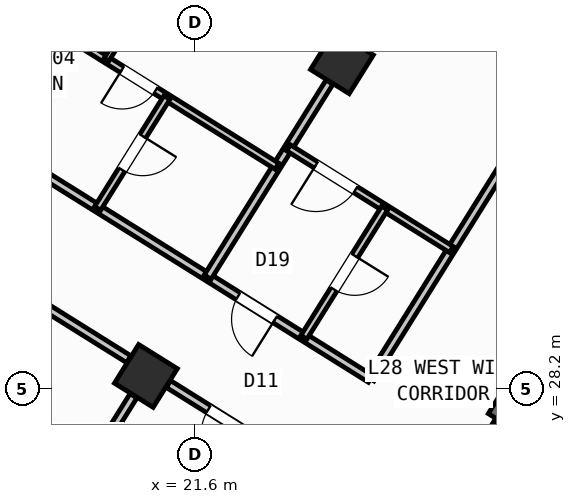
"""IFC4 building model, lengths in metres.
Left out: names, types, materials, properties, quantities, classifications, styles, units other than length and angle.
Written with IfcOpenShell. Run it as: python <this file> out.ifc"""

import sys

from ifc_helpers import new_model, si_unit, direction, frame, frame_2d, origin, origin_2d, place, context, subcontext, project, spatial, rectangle, hollow_rectangle, extrude, source, transform, mapped, element, fill, save


model = new_model("IFC4")
c1 = context("Model", 3, precision=1e-05, world=origin(), true_north=direction((0.0, 1.0)))
c2 = subcontext(c1, "Body", "Model", "MODEL_VIEW")
j1 = project(units=[si_unit("LENGTHUNIT", "METRE"), si_unit("PLANEANGLEUNIT", "RADIAN")], contexts=[c1])
p1 = place(None, origin())
s1 = spatial("IfcSite", under=j1, at=p1, CompositionType="ELEMENT")
p2 = place(p1, origin())
s2 = spatial("IfcBuilding", under=s1, at=p2, CompositionType="ELEMENT")
p3 = place(p2, frame((0.0, 0.0, 112.5)))
s3 = spatial("IfcBuildingStorey", under=s2, at=p3, CompositionType="ELEMENT", Elevation=112.5)
p4 = place(p3, frame((29.517, 30.594, 0.0), z_axis=(0.0, 0.0, 1.0), x_axis=(-0.529906864564, -0.848055844204, 0.0)))
e1 = element("IfcWall", 1, at=p4, inside=s3, PredefinedType="SHEAR", context=c2, shape_type="SweptSolid", body=[
    extrude(rectangle(XDim=3.575, YDim=0.55, at=frame_2d((1.788, 0.0))), origin(), (0.0, 0.0, 1.0), 3.35),
])
m1 = source(origin(), c2, "Body", "SweptSolid", [
    extrude(hollow_rectangle(XDim=0.9, YDim=0.9, WallThickness=0.036, at=origin_2d()), origin(), (0.0, 0.0, 1.0), 3.6),
])
for number, where, z_axis, x_axis in (
    (2, (24.5, 34.643, 0.0), (0.0, 0.0, 1.0), (-0.848, 0.53, 0.0)),
    (3, (20.632, 28.452, 0.0), (0.0, 0.0, 1.0), (-0.848, 0.53, 0.0)),
):
    element("IfcColumn", number, at=place(p3, frame(where, z_axis=z_axis, x_axis=x_axis)), inside=s3, PredefinedType="COLUMN", context=c2, shape_type="MappedRepresentation", body=[
        mapped(m1, transform((0.0, 0.0, 0.0), scale=1.0)),
    ])
p5 = place(p3, frame((31.76, 12.183, 0.0), z_axis=(0.0, 0.0, 1.0), x_axis=(-0.848047074256, 0.529920899612, 0.0)))
e4 = element("IfcWall", 4, at=p5, inside=s3, PredefinedType="STANDARD", context=c2, shape_type="SweptSolid", body=[
    extrude(rectangle(XDim=30.652, YDim=0.32, at=frame_2d((15.326, 0.0))), origin(), (0.0, 0.0, 1.0), 3.35),
])
p6 = place(p5, frame((15.153, 0.0, 0.0)))
e5 = element("IfcOpeningElement", 5, at=p6, cuts=e4, PredefinedType="OPENING", context=c2, shape_type="SweptSolid", body=[
    extrude(rectangle(XDim=1.2, YDim=2.15, at=frame_2d((0.6, 1.075))), frame((0.0, 0.17, 0.0), z_axis=(0.0, -1.0, 0.0), x_axis=(1.0, 0.0, 0.0)), (0.0, 0.0, 1.0), 0.34),
])
p7 = place(p5, frame((2.002, 0.0, 0.8)))
e6 = element("IfcOpeningElement", 6, at=p7, cuts=e4, PredefinedType="OPENING", context=c2, shape_type="SweptSolid", body=[
    extrude(rectangle(XDim=2.1, YDim=1.55, at=frame_2d((1.05, 0.775))), frame((0.0, 0.17, 0.0), z_axis=(0.0, -1.0, 0.0), x_axis=(1.0, 0.0, 0.0)), (0.0, 0.0, 1.0), 0.34),
])
p8 = place(p5, frame((7.206, 0.0, 0.8)))
e7 = element("IfcOpeningElement", 7, at=p8, cuts=e4, PredefinedType="OPENING", context=c2, shape_type="SweptSolid", body=[
    extrude(rectangle(XDim=2.1, YDim=1.55, at=frame_2d((1.05, 0.775))), frame((0.0, 0.17, 0.0), z_axis=(0.0, -1.0, 0.0), x_axis=(1.0, 0.0, 0.0)), (0.0, 0.0, 1.0), 0.34),
])
p9 = place(p5, frame((12.648, 0.0, 1.0)))
e8 = element("IfcOpeningElement", 8, at=p9, cuts=e4, PredefinedType="OPENING", context=c2, shape_type="SweptSolid", body=[
    extrude(rectangle(XDim=0.9, YDim=1.25, at=frame_2d((0.45, 0.625))), frame((0.0, 0.17, 0.0), z_axis=(0.0, -1.0, 0.0), x_axis=(1.0, 0.0, 0.0)), (0.0, 0.0, 1.0), 0.34),
])
p10 = place(p5, frame((19.59, 0.0, 0.95)))
e9 = element("IfcOpeningElement", 9, at=p10, cuts=e4, PredefinedType="OPENING", context=c2, shape_type="SweptSolid", body=[
    extrude(rectangle(XDim=1.2, YDim=1.4, at=frame_2d((0.6, 0.7))), frame((0.0, 0.17, 0.0), z_axis=(0.0, -1.0, 0.0), x_axis=(1.0, 0.0, 0.0)), (0.0, 0.0, 1.0), 0.34),
])
p11 = place(p5, frame((25.966, 0.0, 1.0)))
e10 = element("IfcOpeningElement", 10, at=p11, cuts=e4, PredefinedType="OPENING", context=c2, shape_type="SweptSolid", body=[
    extrude(rectangle(XDim=0.9, YDim=1.25, at=frame_2d((0.45, 0.625))), frame((0.0, 0.17, 0.0), z_axis=(0.0, -1.0, 0.0), x_axis=(1.0, 0.0, 0.0)), (0.0, 0.0, 1.0), 0.34),
])
p12 = place(p5, frame((28.871, 0.0, 1.0)))
e11 = element("IfcOpeningElement", 11, at=p12, cuts=e4, PredefinedType="OPENING", context=c2, shape_type="SweptSolid", body=[
    extrude(rectangle(XDim=0.9, YDim=1.25, at=frame_2d((0.45, 0.625))), frame((0.0, 0.17, 0.0), z_axis=(0.0, -1.0, 0.0), x_axis=(1.0, 0.0, 0.0)), (0.0, 0.0, 1.0), 0.34),
])
p13 = place(p3, frame((17.424, 47.083, 0.0), z_axis=(0.0, 0.0, 1.0), x_axis=(0.848049927979, -0.529916332693, 0.0)))
e12 = element("IfcWall", 12, at=p13, inside=s3, PredefinedType="STANDARD", context=c2, shape_type="SweptSolid", body=[
    extrude(rectangle(XDim=29.223, YDim=0.32, at=frame_2d((14.612, 0.0))), origin(), (0.0, 0.0, 1.0), 3.35),
])
p14 = place(p13, frame((3.77, 0.0, 0.0)))
e13 = element("IfcOpeningElement", 13, at=p14, cuts=e12, PredefinedType="OPENING", context=c2, shape_type="SweptSolid", body=[
    extrude(rectangle(XDim=1.05, YDim=2.15, at=frame_2d((0.525, 1.075))), frame((0.0, 0.17, 0.0), z_axis=(0.0, -1.0, 0.0), x_axis=(1.0, 0.0, 0.0)), (0.0, 0.0, 1.0), 0.34),
])
p15 = place(p13, frame((0.9, 0.0, 0.8)))
e14 = element("IfcOpeningElement", 14, at=p15, cuts=e12, PredefinedType="OPENING", context=c2, shape_type="SweptSolid", body=[
    extrude(rectangle(XDim=2.1, YDim=1.55, at=frame_2d((1.05, 0.775))), frame((0.0, 0.17, 0.0), z_axis=(0.0, -1.0, 0.0), x_axis=(1.0, 0.0, 0.0)), (0.0, 0.0, 1.0), 0.34),
])
p16 = place(p13, frame((6.972, 0.0, 1.0)))
e15 = element("IfcOpeningElement", 15, at=p16, cuts=e12, PredefinedType="OPENING", context=c2, shape_type="SweptSolid", body=[
    extrude(rectangle(XDim=0.9, YDim=1.25, at=frame_2d((0.45, 0.625))), frame((0.0, 0.17, 0.0), z_axis=(0.0, -1.0, 0.0), x_axis=(1.0, 0.0, 0.0)), (0.0, 0.0, 1.0), 0.34),
])
p17 = place(p13, frame((9.847, 0.0, 0.85)))
e16 = element("IfcOpeningElement", 16, at=p17, cuts=e12, PredefinedType="OPENING", context=c2, shape_type="SweptSolid", body=[
    extrude(rectangle(XDim=1.5, YDim=1.5, at=frame_2d((0.75, 0.75))), frame((0.0, 0.17, 0.0), z_axis=(0.0, -1.0, 0.0), x_axis=(1.0, 0.0, 0.0)), (0.0, 0.0, 1.0), 0.34),
])
p18 = place(p13, frame((13.889, 0.0, 0.95)))
e17 = element("IfcOpeningElement", 17, at=p18, cuts=e12, PredefinedType="OPENING", context=c2, shape_type="SweptSolid", body=[
    extrude(rectangle(XDim=1.2, YDim=1.4, at=frame_2d((0.6, 0.7))), frame((0.0, 0.17, 0.0), z_axis=(0.0, -1.0, 0.0), x_axis=(1.0, 0.0, 0.0)), (0.0, 0.0, 1.0), 0.34),
])
p19 = place(p13, frame((17.254, 0.0, 1.0)))
e18 = element("IfcOpeningElement", 18, at=p19, cuts=e12, PredefinedType="OPENING", context=c2, shape_type="SweptSolid", body=[
    extrude(rectangle(XDim=0.9, YDim=1.25, at=frame_2d((0.45, 0.625))), frame((0.0, 0.17, 0.0), z_axis=(0.0, -1.0, 0.0), x_axis=(1.0, 0.0, 0.0)), (0.0, 0.0, 1.0), 0.34),
])
p20 = place(p13, frame((20.764, 0.0, 0.8)))
e19 = element("IfcOpeningElement", 19, at=p20, cuts=e12, PredefinedType="OPENING", context=c2, shape_type="SweptSolid", body=[
    extrude(rectangle(XDim=2.1, YDim=1.55, at=frame_2d((1.05, 0.775))), frame((0.0, 0.17, 0.0), z_axis=(0.0, -1.0, 0.0), x_axis=(1.0, 0.0, 0.0)), (0.0, 0.0, 1.0), 0.34),
])
p21 = place(p13, frame((25.403, 0.0, 0.8)))
e20 = element("IfcOpeningElement", 20, at=p21, cuts=e12, PredefinedType="OPENING", context=c2, shape_type="SweptSolid", body=[
    extrude(rectangle(XDim=2.1, YDim=1.55, at=frame_2d((1.05, 0.775))), frame((0.0, 0.17, 0.0), z_axis=(0.0, -1.0, 0.0), x_axis=(1.0, 0.0, 0.0)), (0.0, 0.0, 1.0), 0.34),
])
p22 = place(p3, frame((27.596, 27.52, 0.0), z_axis=(0.0, 0.0, 1.0), x_axis=(-0.529865479138, -0.848081702443, 0.0)))
e21 = element("IfcWall", 21, at=p22, inside=s3, PredefinedType="STANDARD", context=c2, shape_type="SweptSolid", body=[
    extrude(rectangle(XDim=2.96, YDim=0.2, at=frame_2d((1.48, 0.0))), origin(), (0.0, 0.0, 1.0), 3.34),
])
p23 = place(p22, frame((1.76, 0.0, 0.0)))
e22 = element("IfcOpeningElement", 22, at=p23, cuts=e21, PredefinedType="OPENING", context=c2, shape_type="SweptSolid", body=[
    extrude(rectangle(XDim=0.86, YDim=2.05, at=frame_2d((0.43, 1.025))), frame((0.0, 0.11, 0.0), z_axis=(0.0, -1.0, 0.0), x_axis=(1.0, 0.0, 0.0)), (0.0, 0.0, 1.0), 0.22),
])
p24 = place(p3, frame((31.239, 38.274, 0.0), z_axis=(0.0, 0.0, 1.0), x_axis=(-0.529925472745, -0.848044216616, 0.0)))
e23 = element("IfcWall", 23, at=p24, inside=s3, PredefinedType="PARTITIONING", context=c2, shape_type="SweptSolid", body=[
    extrude(rectangle(XDim=11.65, YDim=0.16, at=frame_2d((5.825, 0.0))), origin(), (0.0, 0.0, 1.0), 3.34),
])
p25 = place(p3, frame((25.065, 28.394, 0.0), z_axis=(0.0, 0.0, 1.0), x_axis=(-0.848048310262, 0.529918921593, 0.0)))
e24 = element("IfcWall", 24, at=p25, inside=s3, PredefinedType="PARTITIONING", context=c2, shape_type="SweptSolid", body=[
    extrude(rectangle(XDim=16.73, YDim=0.16, at=frame_2d((8.365, 0.0))), origin(), (0.0, 0.0, 1.0), 3.34),
])
p26 = place(p25, frame((2.22, 0.0, 0.0)))
e25 = element("IfcOpeningElement", 25, at=p26, cuts=e24, PredefinedType="OPENING", context=c2, shape_type="SweptSolid", body=[
    extrude(rectangle(XDim=0.86, YDim=2.05, at=frame_2d((0.43, 1.025))), frame((0.0, 0.09, 0.0), z_axis=(0.0, -1.0, 0.0), x_axis=(1.0, 0.0, 0.0)), (0.0, 0.0, 1.0), 0.18),
])
p27 = place(p25, frame((7.82, 0.0, 0.0)))
e26 = element("IfcOpeningElement", 26, at=p27, cuts=e24, PredefinedType="OPENING", context=c2, shape_type="SweptSolid", body=[
    extrude(rectangle(XDim=1.0, YDim=2.1, at=frame_2d((0.5, 1.05))), frame((0.0, 0.09, 0.0), z_axis=(0.0, -1.0, 0.0), x_axis=(1.0, 0.0, 0.0)), (0.0, 0.0, 1.0), 0.18),
])
p28 = place(p25, frame((12.95, 0.0, 0.0)))
e27 = element("IfcOpeningElement", 27, at=p28, cuts=e24, PredefinedType="OPENING", context=c2, shape_type="SweptSolid", body=[
    extrude(rectangle(XDim=1.0, YDim=2.1, at=frame_2d((0.5, 1.05))), frame((0.0, 0.09, 0.0), z_axis=(0.0, -1.0, 0.0), x_axis=(1.0, 0.0, 0.0)), (0.0, 0.0, 1.0), 0.18),
])
p29 = place(p3, frame((23.899, 26.529, 0.0), z_axis=(0.0, 0.0, 1.0), x_axis=(-0.848064240775, 0.529893426567, 0.0)))
e28 = element("IfcWall", 28, at=p29, inside=s3, PredefinedType="PARTITIONING", context=c2, shape_type="SweptSolid", body=[
    extrude(rectangle(XDim=3.328, YDim=0.16, at=frame_2d((1.664, 0.0))), origin(), (0.0, 0.0, 1.0), 2.775),
])
p30 = place(p29, frame((1.395, 0.0, 0.0)))
e29 = element("IfcOpeningElement", 29, at=p30, cuts=e28, PredefinedType="OPENING", context=c2, shape_type="SweptSolid", body=[
    extrude(rectangle(XDim=1.0, YDim=2.1, at=frame_2d((0.5, 1.05))), frame((0.0, 0.09, 0.0), z_axis=(0.0, -1.0, 0.0), x_axis=(1.0, 0.0, 0.0)), (0.0, 0.0, 1.0), 0.18),
])
p31 = place(p3, frame((20.293, 28.782, 0.0), z_axis=(0.0, 0.0, 1.0), x_axis=(-0.848040881926, 0.529930809241, 0.0)))
e30 = element("IfcWall", 30, at=p31, inside=s3, PredefinedType="PARTITIONING", context=c2, shape_type="SweptSolid", body=[
    extrude(rectangle(XDim=5.476, YDim=0.16, at=frame_2d((2.738, 0.0))), origin(), (0.0, 0.0, 1.0), 2.775),
])
p32 = place(p31, frame((3.568, 0.0, 0.0)))
e31 = element("IfcOpeningElement", 31, at=p32, cuts=e30, PredefinedType="OPENING", context=c2, shape_type="SweptSolid", body=[
    extrude(rectangle(XDim=1.0, YDim=2.1, at=frame_2d((0.5, 1.05))), frame((0.0, 0.09, 0.0), z_axis=(0.0, -1.0, 0.0), x_axis=(1.0, 0.0, 0.0)), (0.0, 0.0, 1.0), 0.18),
])
p33 = place(p3, frame((20.387, 28.06, 0.0), z_axis=(0.0, 0.0, 1.0), x_axis=(-0.529902564924, -0.848058530814, 0.0)))
e32 = element("IfcWall", 32, at=p33, inside=s3, PredefinedType="PARTITIONING", context=c2, shape_type="SweptSolid", body=[
    extrude(rectangle(XDim=6.376, YDim=0.16, at=frame_2d((3.188, 0.0))), origin(), (0.0, 0.0, 1.0), 2.775),
])
p34 = place(p3, frame((19.318, 26.349, 0.0), z_axis=(0.0, 0.0, 1.0), x_axis=(-0.848039019877, 0.529933789039, 0.0)))
e33 = element("IfcWall", 33, at=p34, inside=s3, PredefinedType="PLUMBINGWALL", context=c2, shape_type="SweptSolid", body=[
    extrude(rectangle(XDim=6.4, YDim=0.14, at=frame_2d((3.2, 0.0))), origin(), (0.0, 0.0, 1.0), 3.34),
])
p35 = place(p34, frame((2.824, 0.0, 0.0)))
e34 = element("IfcOpeningElement", 34, at=p35, cuts=e33, PredefinedType="OPENING", context=c2, shape_type="SweptSolid", body=[
    extrude(rectangle(XDim=0.78, YDim=2.05, at=frame_2d((0.39, 1.025))), frame((0.0, 0.08, 0.0), z_axis=(0.0, -1.0, 0.0), x_axis=(1.0, 0.0, 0.0)), (0.0, 0.0, 1.0), 0.16),
])
p36 = place(p3, frame((24.256, 34.251, 0.0), z_axis=(0.0, 0.0, 1.0), x_axis=(-0.529926399231, -0.848043637673, 0.0)))
e35 = element("IfcWall", 35, at=p36, inside=s3, PredefinedType="PARTITIONING", context=c2, shape_type="SweptSolid", body=[
    extrude(rectangle(XDim=4.538, YDim=0.16, at=frame_2d((2.269, 0.0))), origin(), (0.0, 0.0, 1.0), 2.775),
])
p37 = place(p3, frame((26.66, 30.947, 0.0), z_axis=(0.0, 0.0, 1.0), x_axis=(-0.84803087207, 0.529946827537, 0.0)))
e36 = element("IfcWall", 36, at=p37, inside=s3, PredefinedType="PLUMBINGWALL", context=c2, shape_type="SweptSolid", body=[
    extrude(rectangle(XDim=3.79, YDim=0.14, at=frame_2d((1.895, 0.0))), origin(), (0.0, 0.0, 1.0), 3.34),
])
p38 = place(p37, frame((2.23, 0.0, 0.0)))
e37 = element("IfcOpeningElement", 37, at=p38, cuts=e36, PredefinedType="OPENING", context=c2, shape_type="SweptSolid", body=[
    extrude(rectangle(XDim=0.92, YDim=2.08, at=frame_2d((0.46, 1.04))), frame((0.0, 0.08, 0.0), z_axis=(0.0, -1.0, 0.0), x_axis=(1.0, 0.0, 0.0)), (0.0, 0.0, 1.0), 0.16),
])
p39 = place(p3, frame((25.345, 31.768, 0.0), z_axis=(0.0, 0.0, 1.0), x_axis=(-0.529882284462, -0.848071202561, 0.0)))
e38 = element("IfcWall", 38, at=p39, inside=s3, PredefinedType="PLUMBINGWALL", context=c2, shape_type="SweptSolid", body=[
    extrude(rectangle(XDim=3.01, YDim=0.14, at=frame_2d((1.505, 0.0))), origin(), (0.0, 0.0, 1.0), 2.995),
])
p40 = place(p39, frame((1.115, 0.0, 0.0)))
e39 = element("IfcOpeningElement", 39, at=p40, cuts=e38, PredefinedType="OPENING", context=c2, shape_type="SweptSolid", body=[
    extrude(rectangle(XDim=0.78, YDim=2.05, at=frame_2d((0.39, 1.025))), frame((0.0, 0.08, 0.0), z_axis=(0.0, -1.0, 0.0), x_axis=(1.0, 0.0, 0.0)), (0.0, 0.0, 1.0), 0.16),
])
p41 = place(p3, frame((18.828, 37.643, 0.0), z_axis=(0.0, 0.0, 1.0), x_axis=(-0.529926399231, -0.848043637673, 0.0)))
e40 = element("IfcWall", 40, at=p41, inside=s3, PredefinedType="PARTITIONING", context=c2, shape_type="SweptSolid", body=[
    extrude(rectangle(XDim=4.538, YDim=0.16, at=frame_2d((2.269, 0.0))), origin(), (0.0, 0.0, 1.0), 2.775),
])
p42 = place(p3, frame((23.218, 32.591, 0.0), z_axis=(0.0, 0.0, 1.0), x_axis=(-0.848056163074, 0.529906354247, 0.0)))
e41 = element("IfcWall", 41, at=p42, inside=s3, PredefinedType="PLUMBINGWALL", context=c2, shape_type="SweptSolid", body=[
    extrude(rectangle(XDim=6.4, YDim=0.14, at=frame_2d((3.2, 0.0))), origin(), (0.0, 0.0, 1.0), 3.34),
])
p43 = place(p42, frame((2.824, 0.0, 0.0)))
e42 = element("IfcOpeningElement", 42, at=p43, cuts=e41, PredefinedType="OPENING", context=c2, shape_type="SweptSolid", body=[
    extrude(rectangle(XDim=0.78, YDim=2.05, at=frame_2d((0.39, 1.025))), frame((0.0, 0.08, 0.0), z_axis=(0.0, -1.0, 0.0), x_axis=(1.0, 0.0, 0.0)), (0.0, 0.0, 1.0), 0.16),
])
p44 = place(p3, frame((21.047, 33.947, 0.0), z_axis=(0.0, 0.0, 1.0), x_axis=(-0.529913878929, -0.848051461244, 0.0)))
e43 = element("IfcWall", 43, at=p44, inside=s3, PredefinedType="PLUMBINGWALL", context=c2, shape_type="SweptSolid", body=[
    extrude(rectangle(XDim=2.58, YDim=0.14, at=frame_2d((1.29, 0.0))), origin(), (0.0, 0.0, 1.0), 3.34),
])
p45 = place(p44, frame((0.9, 0.0, 0.0)))
e44 = element("IfcOpeningElement", 44, at=p45, cuts=e43, PredefinedType="OPENING", context=c2, shape_type="SweptSolid", body=[
    extrude(rectangle(XDim=0.78, YDim=2.05, at=frame_2d((0.39, 1.025))), frame((0.0, 0.08, 0.0), z_axis=(0.0, -1.0, 0.0), x_axis=(1.0, 0.0, 0.0)), (0.0, 0.0, 1.0), 0.16),
])
p46 = place(p3, frame((24.802, 42.614, 0.0), z_axis=(0.0, 0.0, 1.0), x_axis=(-0.529926099889, -0.848043824727, 0.0)))
e45 = element("IfcWall", 45, at=p46, inside=s3, PredefinedType="PARTITIONING", context=c2, shape_type="SweptSolid", body=[
    extrude(rectangle(XDim=9.34, YDim=0.11, at=frame_2d((4.67, 0.0))), origin(), (0.0, 0.0, 1.0), 3.34),
])
p47 = place(p46, frame((0.47, 0.0, 0.0)))
e46 = element("IfcOpeningElement", 46, at=p47, cuts=e45, PredefinedType="OPENING", context=c2, shape_type="SweptSolid", body=[
    extrude(rectangle(XDim=0.92, YDim=2.08, at=frame_2d((0.46, 1.04))), frame((0.0, 0.065, 0.0), z_axis=(0.0, -1.0, 0.0), x_axis=(1.0, 0.0, 0.0)), (0.0, 0.0, 1.0), 0.13),
])
m2 = source(origin(), c2, "Body", "SweptSolid", [
    extrude(rectangle(XDim=1.0, YDim=2.1, at=frame_2d((0.5, 1.05))), frame((0.0, 0.025, 0.0), z_axis=(0.0, -1.0, 0.0), x_axis=(1.0, 0.0, 0.0)), (0.0, 0.0, 1.0), 0.05),
])
p48 = place(p30, origin())
e47 = element("IfcDoor", 47, at=p48, inside=s3, OperationType="SINGLE_SWING_LEFT", PredefinedType="DOOR", context=c2, shape_type="MappedRepresentation", body=[
    mapped(m2, transform((0.0, 0.0, 0.0), scale=1.0)),
])
fill(e29, e47)
m3 = source(origin(), c2, "Body", "SweptSolid", [
    extrude(rectangle(XDim=0.86, YDim=2.05, at=frame_2d((0.43, 1.025))), frame((0.0, 0.025, 0.0), z_axis=(0.0, -1.0, 0.0), x_axis=(1.0, 0.0, 0.0)), (0.0, 0.0, 1.0), 0.05),
])
p49 = place(p26, origin())
e48 = element("IfcDoor", 48, at=p49, inside=s3, OperationType="SINGLE_SWING_LEFT", PredefinedType="DOOR", context=c2, shape_type="MappedRepresentation", body=[
    mapped(m3, transform((0.0, 0.0, 0.0), scale=1.0)),
])
fill(e25, e48)
m4 = source(origin(), c2, "Body", "SweptSolid", [
    extrude(rectangle(XDim=0.92, YDim=2.08, at=frame_2d((0.46, 1.04))), frame((0.0, 0.025, 0.0), z_axis=(0.0, -1.0, 0.0), x_axis=(1.0, 0.0, 0.0)), (0.0, 0.0, 1.0), 0.05),
])
p50 = place(p38, origin())
e49 = element("IfcDoor", 49, at=p50, inside=s3, OperationType="SINGLE_SWING_RIGHT", PredefinedType="DOOR", context=c2, shape_type="MappedRepresentation", body=[
    mapped(m4, transform((0.0, 0.0, 0.0), scale=1.0)),
])
fill(e37, e49)
m5 = source(origin(), c2, "Body", "SweptSolid", [
    extrude(rectangle(XDim=0.78, YDim=2.05, at=frame_2d((0.39, 1.025))), frame((0.0, 0.025, 0.0), z_axis=(0.0, -1.0, 0.0), x_axis=(1.0, 0.0, 0.0)), (0.0, 0.0, 1.0), 0.05),
])
p51 = place(p40, origin())
e50 = element("IfcDoor", 50, at=p51, inside=s3, OperationType="SINGLE_SWING_LEFT", PredefinedType="DOOR", context=c2, shape_type="MappedRepresentation", body=[
    mapped(m5, transform((0.0, 0.0, 0.0), scale=1.0)),
])
fill(e39, e50)
p52 = place(p43, origin())
e51 = element("IfcDoor", 51, at=p52, inside=s3, OperationType="SINGLE_SWING_RIGHT", PredefinedType="DOOR", context=c2, shape_type="MappedRepresentation", body=[
    mapped(m5, transform((0.0, 0.0, 0.0), scale=1.0)),
])
fill(e42, e51)
p53 = place(p45, origin())
e52 = element("IfcDoor", 52, at=p53, inside=s3, OperationType="SINGLE_SWING_LEFT", PredefinedType="DOOR", context=c2, shape_type="MappedRepresentation", body=[
    mapped(m5, transform((0.0, 0.0, 0.0), scale=1.0)),
])
fill(e44, e52)
save(model, sys.argv[1])
